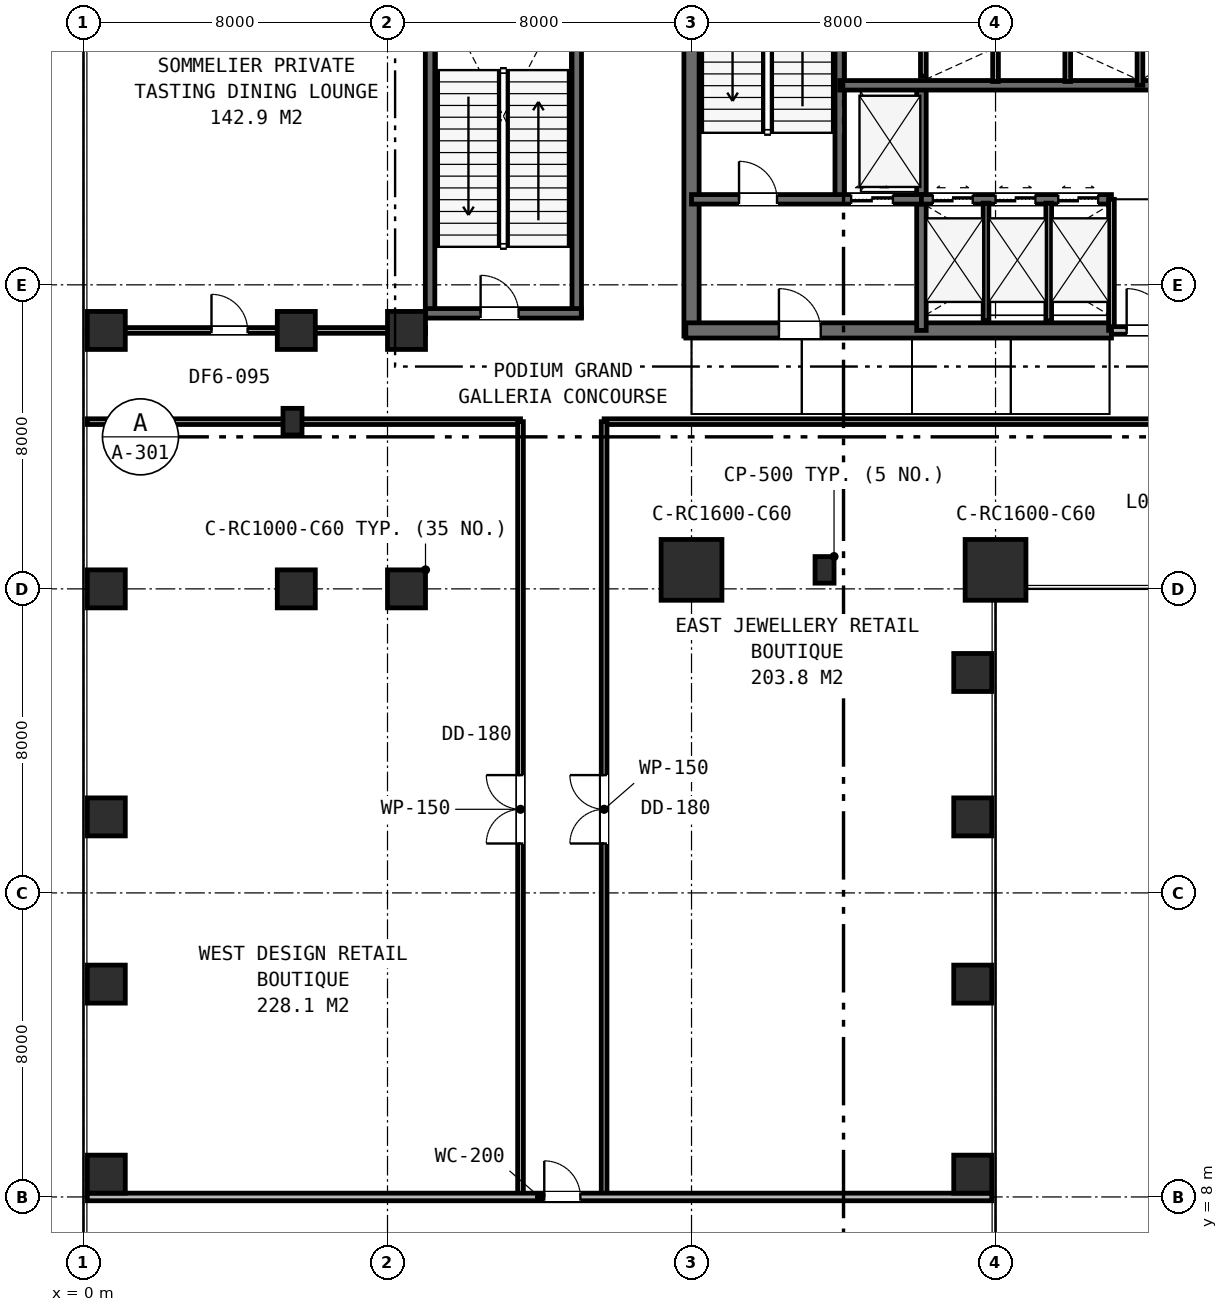
"""IFC4 building model, lengths in metres.
Left out: names, types, materials, properties, quantities, classifications, styles, units other than length and angle.
Written with IfcOpenShell. Run it as: python <this file> out.ifc"""

import sys

from ifc_helpers import new_model, si_unit, direction, frame, frame_2d, origin, origin_2d, place, context, subcontext, project, spatial, rectangle, extrude, element, fill, save


model = new_model("IFC4")
c1 = context("Model", 3, precision=1e-05, world=origin(), true_north=direction((0.0, 1.0)))
c2 = subcontext(c1, "Body", "Model", "MODEL_VIEW")
j1 = project(units=[si_unit("LENGTHUNIT", "METRE"), si_unit("PLANEANGLEUNIT", "RADIAN")], contexts=[c1])
p1 = place(None, origin())
s1 = spatial("IfcSite", under=j1, at=p1, CompositionType="ELEMENT")
p2 = place(p1, origin())
s2 = spatial("IfcBuilding", under=s1, at=p2, CompositionType="ELEMENT")
p3 = place(p2, frame((0.0, 0.0, 6.0)))
s3 = spatial("IfcBuildingStorey", under=s2, at=p3, CompositionType="ELEMENT", Elevation=6.0)
p4 = place(p3, frame((16.0, 30.65, 0.0), z_axis=(0.0, 0.0, 1.0), x_axis=(0.0, 1.0, 0.0)))
e1 = element("IfcWall", 1, at=p4, inside=s3, PredefinedType="SHEAR", context=c2, shape_type="SweptSolid", body=[
    extrude(rectangle(XDim=12.3, YDim=0.4, at=frame_2d((6.15, 0.0))), origin(), (0.0, 0.0, 1.0), 5.1),
])
p5 = place(p3, frame((15.85, 30.8, 0.0), z_axis=(0.0, 0.0, 1.0), x_axis=(1.0, 0.0, 0.0)))
e2 = element("IfcWall", 2, at=p5, inside=s3, PredefinedType="SHEAR", context=c2, shape_type="SweptSolid", body=[
    extrude(rectangle(XDim=11.2, YDim=0.4, at=frame_2d((5.6, 0.0))), origin(), (0.0, 0.0, 1.0), 5.1),
])
p6 = place(p5, frame((2.45, 0.0, 0.0)))
e3 = element("IfcOpeningElement", 3, at=p6, cuts=e2, PredefinedType="OPENING", context=c2, shape_type="SweptSolid", body=[
    extrude(rectangle(XDim=1.1, YDim=2.15, at=frame_2d((0.55, 1.075))), frame((0.0, 0.21, 0.0), z_axis=(0.0, -1.0, 0.0), x_axis=(1.0, 0.0, 0.0)), (0.0, 0.0, 1.0), 0.42),
])
p7 = place(p3, frame((19.9, 34.25, 0.0), z_axis=(0.0, 0.0, 1.0), x_axis=(0.0, 1.0, 0.0)))
e4 = element("IfcWall", 4, at=p7, inside=s3, PredefinedType="SHEAR", context=c2, shape_type="SweptSolid", body=[
    extrude(rectangle(XDim=8.65, YDim=0.25, at=frame_2d((4.325, 0.0))), origin(), (0.0, 0.0, 1.0), 5.1),
])
p8 = place(p3, frame((22.05, 30.8, 0.0), z_axis=(0.0, 0.0, 1.0), x_axis=(0.0, 1.0, 0.0)))
e5 = element("IfcWall", 5, at=p8, inside=s3, PredefinedType="SHEAR", context=c2, shape_type="SweptSolid", body=[
    extrude(rectangle(XDim=6.45, YDim=0.25, at=frame_2d((3.225, 0.0))), origin(), (0.0, 0.0, 1.0), 5.1),
])
p9 = place(p3, frame((16.0, 34.25, 0.0), z_axis=(0.0, 0.0, 1.0), x_axis=(1.0, 0.0, 0.0)))
e6 = element("IfcWall", 6, at=p9, inside=s3, PredefinedType="SHEAR", context=c2, shape_type="SweptSolid", body=[
    extrude(rectangle(XDim=6.05, YDim=0.25, at=frame_2d((3.025, 0.0))), origin(), (0.0, 0.0, 1.0), 5.1),
])
p10 = place(p9, frame((1.25, 0.0, 0.0)))
e7 = element("IfcOpeningElement", 7, at=p10, cuts=e6, PredefinedType="OPENING", context=c2, shape_type="SweptSolid", body=[
    extrude(rectangle(XDim=1.0, YDim=2.15, at=frame_2d((0.5, 1.075))), frame((0.0, 0.135, 0.0), z_axis=(0.0, -1.0, 0.0), x_axis=(1.0, 0.0, 0.0)), (0.0, 0.0, 1.0), 0.27),
])
p11 = place(p9, frame((4.2, 0.0, 0.0)))
e8 = element("IfcOpeningElement", 8, at=p11, cuts=e6, PredefinedType="OPENING", context=c2, shape_type="SweptSolid", body=[
    extrude(rectangle(XDim=1.1, YDim=2.15, at=frame_2d((0.55, 1.075))), frame((0.0, 0.135, 0.0), z_axis=(0.0, -1.0, 0.0), x_axis=(1.0, 0.0, 0.0)), (0.0, 0.0, 1.0), 0.27),
])
p12 = place(p3, frame((22.05, 34.25, 0.0), z_axis=(0.0, 0.0, 1.0), x_axis=(1.0, 0.0, 0.0)))
e9 = element("IfcWall", 9, at=p12, inside=s3, PredefinedType="SHEAR", context=c2, shape_type="SweptSolid", body=[
    extrude(rectangle(XDim=5.0, YDim=0.25, at=frame_2d((2.5, 0.0))), origin(), (0.0, 0.0, 1.0), 5.1),
])
p13 = place(p12, frame((0.3, 0.0, 0.0)))
e10 = element("IfcOpeningElement", 10, at=p13, cuts=e9, PredefinedType="OPENING", context=c2, shape_type="SweptSolid", body=[
    extrude(rectangle(XDim=1.05, YDim=2.15, at=frame_2d((0.525, 1.075))), frame((0.0, 0.135, 0.0), z_axis=(0.0, -1.0, 0.0), x_axis=(1.0, 0.0, 0.0)), (0.0, 0.0, 1.0), 0.27),
])
p14 = place(p12, frame((1.95, 0.0, 0.0)))
e11 = element("IfcOpeningElement", 11, at=p14, cuts=e9, PredefinedType="OPENING", context=c2, shape_type="SweptSolid", body=[
    extrude(rectangle(XDim=1.05, YDim=2.15, at=frame_2d((0.525, 1.075))), frame((0.0, 0.135, 0.0), z_axis=(0.0, -1.0, 0.0), x_axis=(1.0, 0.0, 0.0)), (0.0, 0.0, 1.0), 0.27),
])
p15 = place(p12, frame((3.6, 0.0, 0.0)))
e12 = element("IfcOpeningElement", 12, at=p15, cuts=e9, PredefinedType="OPENING", context=c2, shape_type="SweptSolid", body=[
    extrude(rectangle(XDim=1.05, YDim=2.15, at=frame_2d((0.525, 1.075))), frame((0.0, 0.135, 0.0), z_axis=(0.0, -1.0, 0.0), x_axis=(1.0, 0.0, 0.0)), (0.0, 0.0, 1.0), 0.27),
])
p16 = place(p3, frame((19.9, 37.25, 0.0), z_axis=(0.0, 0.0, 1.0), x_axis=(1.0, 0.0, 0.0)))
e13 = element("IfcWall", 13, at=p16, inside=s3, PredefinedType="SHEAR", context=c2, shape_type="SweptSolid", body=[
    extrude(rectangle(XDim=16.2, YDim=0.25, at=frame_2d((8.1, 0.0))), origin(), (0.0, 0.0, 1.0), 5.1),
])
p17 = place(p16, frame((12.55, 0.0, 0.0)))
e14 = element("IfcOpeningElement", 14, at=p17, cuts=e13, PredefinedType="OPENING", context=c2, shape_type="SweptSolid", body=[
    extrude(rectangle(XDim=0.9, YDim=2.15, at=frame_2d((0.45, 1.075))), frame((0.0, 0.135, 0.0), z_axis=(0.0, -1.0, 0.0), x_axis=(1.0, 0.0, 0.0)), (0.0, 0.0, 1.0), 0.27),
])
for number, where, z_axis, x_axis in (
    (15, (9.12, 31.15, 0.0), (0.0, 0.0, 1.0), (0.0, 1.0, 0.0)),
    (16, (12.98, 31.15, 0.0), (0.0, 0.0, 1.0), (0.0, 1.0, 0.0)),
):
    element("IfcWall", number, at=place(p3, frame(where, z_axis=z_axis, x_axis=x_axis)), inside=s3, PredefinedType="SHEAR", context=c2, shape_type="SweptSolid", body=[
        extrude(rectangle(XDim=8.8, YDim=0.25, at=frame_2d((4.4, 0.0))), origin(), (0.0, 0.0, 1.0), 5.1),
    ])
p18 = place(p3, frame((9.0, 31.25, 0.0), z_axis=(0.0, 0.0, 1.0), x_axis=(1.0, 0.0, 0.0)))
e17 = element("IfcWall", 17, at=p18, inside=s3, PredefinedType="SHEAR", context=c2, shape_type="SweptSolid", body=[
    extrude(rectangle(XDim=4.1, YDim=0.25, at=frame_2d((2.05, 0.0))), origin(), (0.0, 0.0, 1.0), 5.1),
])
p19 = place(p18, frame((1.45, 0.0, 0.0)))
e18 = element("IfcOpeningElement", 18, at=p19, cuts=e17, PredefinedType="OPENING", context=c2, shape_type="SweptSolid", body=[
    extrude(rectangle(XDim=1.0, YDim=2.15, at=frame_2d((0.5, 1.075))), frame((0.0, 0.135, 0.0), z_axis=(0.0, -1.0, 0.0), x_axis=(1.0, 0.0, 0.0)), (0.0, 0.0, 1.0), 0.27),
])
p20 = place(p3, frame((8.5, 24.0, 0.0), z_axis=(0.0, 0.0, 1.0), x_axis=(1.0, 0.0, 0.0)))
e19 = element("IfcColumn", 19, at=p20, inside=s3, PredefinedType="COLUMN", context=c2, shape_type="SweptSolid", body=[
    extrude(rectangle(XDim=1.0, YDim=1.0, at=origin_2d()), origin(), (0.0, 0.0, 1.0), 5.1),
])
for number, where, z_axis, x_axis in (
    (20, (16.0, 24.5, 0.0), (0.0, 0.0, 1.0), (1.0, 0.0, 0.0)),
    (21, (24.0, 24.5, 0.0), (0.0, 0.0, 1.0), (1.0, 0.0, 0.0)),
):
    element("IfcColumn", number, at=place(p3, frame(where, z_axis=z_axis, x_axis=x_axis)), inside=s3, PredefinedType="COLUMN", context=c2, shape_type="SweptSolid", body=[
        extrude(rectangle(XDim=1.6, YDim=1.6, at=origin_2d()), origin(), (0.0, 0.0, 1.0), 5.1),
    ])
for number, where, z_axis, x_axis in (
    (22, (5.6, 24.0, 0.0), (0.0, 0.0, 1.0), (1.0, 0.0, 0.0)),
    (23, (5.6, 30.8, 0.0), (0.0, 0.0, 1.0), (1.0, 0.0, 0.0)),
    (24, (8.5, 30.8, 0.0), (0.0, 0.0, 1.0), (1.0, 0.0, 0.0)),
    (25, (0.6, 24.0, 0.0), (0.0, 0.0, 1.0), (1.0, 0.0, 0.0)),
    (26, (0.6, 30.8, 0.0), (0.0, 0.0, 1.0), (1.0, 0.0, 0.0)),
    (27, (0.6, 8.6, 0.0), (0.0, 0.0, 1.0), (1.0, 0.0, 0.0)),
    (28, (0.6, 13.6, 0.0), (0.0, 0.0, 1.0), (1.0, 0.0, 0.0)),
    (29, (0.6, 18.0, 0.0), (0.0, 0.0, 1.0), (1.0, 0.0, 0.0)),
    (30, (23.4, 8.6, 0.0), (0.0, 0.0, 1.0), (1.0, 0.0, 0.0)),
    (31, (23.4, 13.6, 0.0), (0.0, 0.0, 1.0), (1.0, 0.0, 0.0)),
    (32, (23.4, 18.0, 0.0), (0.0, 0.0, 1.0), (1.0, 0.0, 0.0)),
    (33, (23.4, 21.8, 0.0), (0.0, 0.0, 1.0), (1.0, 0.0, 0.0)),
):
    element("IfcColumn", number, at=place(p3, frame(where, z_axis=z_axis, x_axis=x_axis)), inside=s3, PredefinedType="COLUMN", context=c2, shape_type="SweptSolid", body=[
        extrude(rectangle(XDim=1.0, YDim=1.0, at=origin_2d()), origin(), (0.0, 0.0, 1.0), 5.1),
    ])
p21 = place(p3, frame((27.05, 30.8, 0.0), z_axis=(0.0, 0.0, 1.0), x_axis=(0.0, 1.0, 0.0)))
e34 = element("IfcWall", 34, at=p21, inside=s3, PredefinedType="PLUMBINGWALL", context=c2, shape_type="SweptSolid", body=[
    extrude(rectangle(XDim=3.45, YDim=0.15, at=frame_2d((1.725, 0.0))), origin(), (0.0, 0.0, 1.0), 4.51),
])
p22 = place(p3, frame((27.05, 30.8, 0.0), z_axis=(0.0, 0.0, 1.0), x_axis=(1.0, 0.0, 0.0)))
e35 = element("IfcWall", 35, at=p22, inside=s3, PredefinedType="PARTITIONING", context=c2, shape_type="SweptSolid", body=[
    extrude(rectangle(XDim=1.9, YDim=0.2, at=frame_2d((0.95, 0.0))), origin(), (0.0, 0.0, 1.0), 4.51),
])
p23 = place(p22, frame((0.4, 0.0, 0.0)))
e36 = element("IfcOpeningElement", 36, at=p23, cuts=e35, PredefinedType="OPENING", context=c2, shape_type="SweptSolid", body=[
    extrude(rectangle(XDim=1.1, YDim=2.15, at=frame_2d((0.55, 1.075))), frame((0.0, 0.11, 0.0), z_axis=(0.0, -1.0, 0.0), x_axis=(1.0, 0.0, 0.0)), (0.0, 0.0, 1.0), 0.22),
])
for number, where, z_axis, x_axis in (
    (37, (23.75, 31.05, 0.0), (0.0, 0.0, 1.0), (0.0, 1.0, 0.0)),
    (38, (25.4, 31.05, 0.0), (0.0, 0.0, 1.0), (0.0, 1.0, 0.0)),
):
    element("IfcWall", number, at=place(p3, frame(where, z_axis=z_axis, x_axis=x_axis)), inside=s3, PredefinedType="PLUMBINGWALL", context=c2, shape_type="SweptSolid", body=[
        extrude(rectangle(XDim=3.1, YDim=0.15, at=frame_2d((1.55, 0.0))), origin(), (0.0, 0.0, 1.0), 4.77),
    ])
p24 = place(p3, frame((22.1, 37.49, 0.0), z_axis=(0.0, 0.0, 1.0), x_axis=(0.0, 1.0, 0.0)))
e39 = element("IfcWall", 39, at=p24, inside=s3, PredefinedType="PLUMBINGWALL", context=c2, shape_type="SweptSolid", body=[
    extrude(rectangle(XDim=2.56, YDim=0.15, at=frame_2d((1.28, 0.0))), origin(), (0.0, 0.0, 1.0), 4.77),
])
p25 = place(p3, frame((27.8, 37.25, 0.0), z_axis=(0.0, 0.0, 1.0), x_axis=(0.0, 1.0, 0.0)))
e40 = element("IfcWall", 40, at=p25, inside=s3, PredefinedType="PLUMBINGWALL", context=c2, shape_type="SweptSolid", body=[
    extrude(rectangle(XDim=2.8, YDim=0.15, at=frame_2d((1.4, 0.0))), origin(), (0.0, 0.0, 1.0), 4.77),
])
for number, where, z_axis, x_axis in (
    (41, (24.0, 37.35, 0.0), (0.0, 0.0, 1.0), (0.0, 1.0, 0.0)),
    (42, (25.9, 37.35, 0.0), (0.0, 0.0, 1.0), (0.0, 1.0, 0.0)),
):
    element("IfcWall", number, at=place(p3, frame(where, z_axis=z_axis, x_axis=x_axis)), inside=s3, PredefinedType="PLUMBINGWALL", context=c2, shape_type="SweptSolid", body=[
        extrude(rectangle(XDim=2.6, YDim=0.15, at=frame_2d((1.3, 0.0))), origin(), (0.0, 0.0, 1.0), 4.77),
    ])
p26 = place(p3, frame((0.1, 30.8, 0.0), z_axis=(0.0, 0.0, 1.0), x_axis=(1.0, 0.0, 0.0)))
e43 = element("IfcWall", 43, at=p26, inside=s3, PredefinedType="PARTITIONING", context=c2, shape_type="SweptSolid", body=[
    extrude(rectangle(XDim=8.9, YDim=0.15, at=frame_2d((4.45, 0.0))), origin(), (0.0, 0.0, 1.0), 4.12),
])
p27 = place(p26, frame((3.268, 0.0, 0.0)))
e44 = element("IfcOpeningElement", 44, at=p27, cuts=e43, PredefinedType="OPENING", context=c2, shape_type="SweptSolid", body=[
    extrude(rectangle(XDim=0.95, YDim=2.15, at=frame_2d((0.475, 1.075))), frame((0.0, 0.085, 0.0), z_axis=(0.0, -1.0, 0.0), x_axis=(1.0, 0.0, 0.0)), (0.0, 0.0, 1.0), 0.17),
])
p28 = place(p3, frame((13.7, 28.4, 0.0), z_axis=(0.0, 0.0, 1.0), x_axis=(1.0, 0.0, 0.0)))
e45 = element("IfcWall", 45, at=p28, inside=s3, PredefinedType="PARTITIONING", context=c2, shape_type="SweptSolid", body=[
    extrude(rectangle(XDim=42.2, YDim=0.15, at=frame_2d((21.1, 0.0))), origin(), (0.0, 0.0, 1.0), 4.12),
])
p29 = place(p28, frame((17.15, 0.0, 0.0)))
e46 = element("IfcOpeningElement", 46, at=p29, cuts=e45, PredefinedType="OPENING", context=c2, shape_type="SweptSolid", body=[
    extrude(rectangle(XDim=1.8, YDim=2.15, at=frame_2d((0.9, 1.075))), frame((0.0, 0.085, 0.0), z_axis=(0.0, -1.0, 0.0), x_axis=(1.0, 0.0, 0.0)), (0.0, 0.0, 1.0), 0.17),
])
p30 = place(p28, frame((33.525, 0.0, 0.0)))
e47 = element("IfcOpeningElement", 47, at=p30, cuts=e45, PredefinedType="OPENING", context=c2, shape_type="SweptSolid", body=[
    extrude(rectangle(XDim=0.95, YDim=2.15, at=frame_2d((0.475, 1.075))), frame((0.0, 0.085, 0.0), z_axis=(0.0, -1.0, 0.0), x_axis=(1.0, 0.0, 0.0)), (0.0, 0.0, 1.0), 0.17),
])
p31 = place(p3, frame((0.1, 28.4, 0.0), z_axis=(0.0, 0.0, 1.0), x_axis=(1.0, 0.0, 0.0)))
e48 = element("IfcWall", 48, at=p31, inside=s3, PredefinedType="PARTITIONING", context=c2, shape_type="SweptSolid", body=[
    extrude(rectangle(XDim=11.4, YDim=0.15, at=frame_2d((5.7, 0.0))), origin(), (0.0, 0.0, 1.0), 4.12),
])
p32 = place(p3, frame((11.5, 8.0, 0.0), z_axis=(0.0, 0.0, 1.0), x_axis=(0.0, 1.0, 0.0)))
e49 = element("IfcWall", 49, at=p32, inside=s3, PredefinedType="PARTITIONING", context=c2, shape_type="SweptSolid", body=[
    extrude(rectangle(XDim=20.4, YDim=0.15, at=frame_2d((10.2, 0.0))), origin(), (0.0, 0.0, 1.0), 4.12),
])
p33 = place(p32, frame((9.3, 0.0, 0.0)))
e50 = element("IfcOpeningElement", 50, at=p33, cuts=e49, PredefinedType="OPENING", context=c2, shape_type="SweptSolid", body=[
    extrude(rectangle(XDim=1.8, YDim=2.15, at=frame_2d((0.9, 1.075))), frame((0.0, 0.085, 0.0), z_axis=(0.0, -1.0, 0.0), x_axis=(1.0, 0.0, 0.0)), (0.0, 0.0, 1.0), 0.17),
])
p34 = place(p3, frame((13.7, 8.0, 0.0), z_axis=(0.0, 0.0, 1.0), x_axis=(0.0, 1.0, 0.0)))
e51 = element("IfcWall", 51, at=p34, inside=s3, PredefinedType="PARTITIONING", context=c2, shape_type="SweptSolid", body=[
    extrude(rectangle(XDim=20.4, YDim=0.15, at=frame_2d((10.2, 0.0))), origin(), (0.0, 0.0, 1.0), 4.12),
])
p35 = place(p34, frame((9.3, 0.0, 0.0)))
e52 = element("IfcOpeningElement", 52, at=p35, cuts=e51, PredefinedType="OPENING", context=c2, shape_type="SweptSolid", body=[
    extrude(rectangle(XDim=1.8, YDim=2.15, at=frame_2d((0.9, 1.075))), frame((0.0, 0.085, 0.0), z_axis=(0.0, -1.0, 0.0), x_axis=(1.0, 0.0, 0.0)), (0.0, 0.0, 1.0), 0.17),
])
p36 = place(p3, frame((0.1, 8.0, 0.0), z_axis=(0.0, 0.0, 1.0), x_axis=(1.0, 0.0, 0.0)))
e53 = element("IfcWall", 53, at=p36, inside=s3, PredefinedType="PARTITIONING", context=c2, shape_type="SweptSolid", body=[
    extrude(rectangle(XDim=23.8, YDim=0.2, at=frame_2d((11.9, 0.0))), origin(), (0.0, 0.0, 1.0), 4.77),
])
p37 = place(p36, frame((12.025, 0.0, 0.0)))
e54 = element("IfcOpeningElement", 54, at=p37, cuts=e53, PredefinedType="OPENING", context=c2, shape_type="SweptSolid", body=[
    extrude(rectangle(XDim=0.95, YDim=2.15, at=frame_2d((0.475, 1.075))), frame((0.0, 0.11, 0.0), z_axis=(0.0, -1.0, 0.0), x_axis=(1.0, 0.0, 0.0)), (0.0, 0.0, 1.0), 0.22),
])
for number, where, z_axis, x_axis in (
    (55, (19.5, 24.5, 0.0), (0.0, 0.0, 1.0), (1.0, 0.0, 0.0)),
    (56, (5.5, 28.4, 0.0), (0.0, 0.0, 1.0), (1.0, 0.0, 0.0)),
):
    element("IfcColumn", number, at=place(p3, frame(where, z_axis=z_axis, x_axis=x_axis)), inside=s3, PredefinedType="PILASTER", context=c2, shape_type="SweptSolid", body=[
        extrude(rectangle(XDim=0.5, YDim=0.7, at=origin_2d()), origin(), (0.0, 0.0, 1.0), 4.78),
    ])
p38 = place(p23, origin())
e57 = element("IfcDoor", 57, at=p38, inside=s3, OperationType="SINGLE_SWING_LEFT", PredefinedType="DOOR", context=c2, shape_type="SweptSolid", body=[
    extrude(rectangle(XDim=1.1, YDim=2.15, at=frame_2d((0.55, 1.075))), frame((0.0, 0.025, 0.0), z_axis=(0.0, -1.0, 0.0), x_axis=(1.0, 0.0, 0.0)), (0.0, 0.0, 1.0), 0.05),
])
fill(e36, e57)
p39 = place(p10, origin())
e58 = element("IfcDoor", 58, at=p39, inside=s3, OperationType="SINGLE_SWING_LEFT", PredefinedType="DOOR", context=c2, shape_type="SweptSolid", body=[
    extrude(rectangle(XDim=1.0, YDim=2.15, at=frame_2d((0.5, 1.075))), frame((0.0, 0.025, 0.0), z_axis=(0.0, -1.0, 0.0), x_axis=(1.0, 0.0, 0.0)), (0.0, 0.0, 1.0), 0.05),
])
fill(e7, e58)
p40 = place(p6, origin())
e59 = element("IfcDoor", 59, at=p40, inside=s3, OperationType="SINGLE_SWING_LEFT", PredefinedType="DOOR", context=c2, shape_type="SweptSolid", body=[
    extrude(rectangle(XDim=1.1, YDim=2.15, at=frame_2d((0.55, 1.075))), frame((0.0, 0.025, 0.0), z_axis=(0.0, -1.0, 0.0), x_axis=(1.0, 0.0, 0.0)), (0.0, 0.0, 1.0), 0.05),
])
fill(e3, e59)
p41 = place(p19, origin())
e60 = element("IfcDoor", 60, at=p41, inside=s3, OperationType="SINGLE_SWING_LEFT", PredefinedType="DOOR", context=c2, shape_type="SweptSolid", body=[
    extrude(rectangle(XDim=1.0, YDim=2.15, at=frame_2d((0.5, 1.075))), frame((0.0, 0.025, 0.0), z_axis=(0.0, -1.0, 0.0), x_axis=(1.0, 0.0, 0.0)), (0.0, 0.0, 1.0), 0.05),
])
fill(e18, e60)
p42 = place(p27, origin())
e61 = element("IfcDoor", 61, at=p42, inside=s3, OperationType="SINGLE_SWING_LEFT", PredefinedType="DOOR", context=c2, shape_type="SweptSolid", body=[
    extrude(rectangle(XDim=0.95, YDim=2.15, at=frame_2d((0.475, 1.075))), frame((0.0, 0.025, 0.0), z_axis=(0.0, -1.0, 0.0), x_axis=(1.0, 0.0, 0.0)), (0.0, 0.0, 1.0), 0.05),
])
fill(e44, e61)
p43 = place(p33, origin())
e62 = element("IfcDoor", 62, at=p43, inside=s3, OperationType="DOUBLE_DOOR_SINGLE_SWING", PredefinedType="DOOR", context=c2, shape_type="SweptSolid", body=[
    extrude(rectangle(XDim=1.8, YDim=2.15, at=frame_2d((0.9, 1.075))), frame((0.0, 0.025, 0.0), z_axis=(0.0, -1.0, 0.0), x_axis=(1.0, 0.0, 0.0)), (0.0, 0.0, 1.0), 0.05),
])
fill(e50, e62)
p44 = place(p35, origin())
e63 = element("IfcDoor", 63, at=p44, inside=s3, OperationType="DOUBLE_DOOR_SINGLE_SWING", PredefinedType="DOOR", context=c2, shape_type="SweptSolid", body=[
    extrude(rectangle(XDim=1.8, YDim=2.15, at=frame_2d((0.9, 1.075))), frame((0.0, 0.025, 0.0), z_axis=(0.0, -1.0, 0.0), x_axis=(1.0, 0.0, 0.0)), (0.0, 0.0, 1.0), 0.05),
])
fill(e52, e63)
p45 = place(p37, origin())
e64 = element("IfcDoor", 64, at=p45, inside=s3, OperationType="SINGLE_SWING_LEFT", PredefinedType="DOOR", context=c2, shape_type="SweptSolid", body=[
    extrude(rectangle(XDim=0.95, YDim=2.15, at=frame_2d((0.475, 1.075))), frame((0.0, 0.025, 0.0), z_axis=(0.0, -1.0, 0.0), x_axis=(1.0, 0.0, 0.0)), (0.0, 0.0, 1.0), 0.05),
])
fill(e54, e64)
p46 = place(p11, origin())
e65 = element("IfcDoor", 65, at=p46, inside=s3, OperationType="DOUBLE_DOOR_SLIDING", PredefinedType="DOOR", context=c2, shape_type="SweptSolid", body=[
    extrude(rectangle(XDim=1.1, YDim=2.15, at=frame_2d((0.55, 1.075))), frame((0.0, 0.025, 0.0), z_axis=(0.0, -1.0, 0.0), x_axis=(1.0, 0.0, 0.0)), (0.0, 0.0, 1.0), 0.05),
])
fill(e8, e65)
p47 = place(p13, origin())
e66 = element("IfcDoor", 66, at=p47, inside=s3, OperationType="DOUBLE_DOOR_SLIDING", PredefinedType="DOOR", context=c2, shape_type="SweptSolid", body=[
    extrude(rectangle(XDim=1.05, YDim=2.15, at=frame_2d((0.525, 1.075))), frame((0.0, 0.025, 0.0), z_axis=(0.0, -1.0, 0.0), x_axis=(1.0, 0.0, 0.0)), (0.0, 0.0, 1.0), 0.05),
])
fill(e10, e66)
p48 = place(p14, origin())
e67 = element("IfcDoor", 67, at=p48, inside=s3, OperationType="DOUBLE_DOOR_SLIDING", PredefinedType="DOOR", context=c2, shape_type="SweptSolid", body=[
    extrude(rectangle(XDim=1.05, YDim=2.15, at=frame_2d((0.525, 1.075))), frame((0.0, 0.025, 0.0), z_axis=(0.0, -1.0, 0.0), x_axis=(1.0, 0.0, 0.0)), (0.0, 0.0, 1.0), 0.05),
])
fill(e11, e67)
p49 = place(p15, origin())
e68 = element("IfcDoor", 68, at=p49, inside=s3, OperationType="DOUBLE_DOOR_SLIDING", PredefinedType="DOOR", context=c2, shape_type="SweptSolid", body=[
    extrude(rectangle(XDim=1.05, YDim=2.15, at=frame_2d((0.525, 1.075))), frame((0.0, 0.025, 0.0), z_axis=(0.0, -1.0, 0.0), x_axis=(1.0, 0.0, 0.0)), (0.0, 0.0, 1.0), 0.05),
])
fill(e12, e68)
save(model, sys.argv[1])
